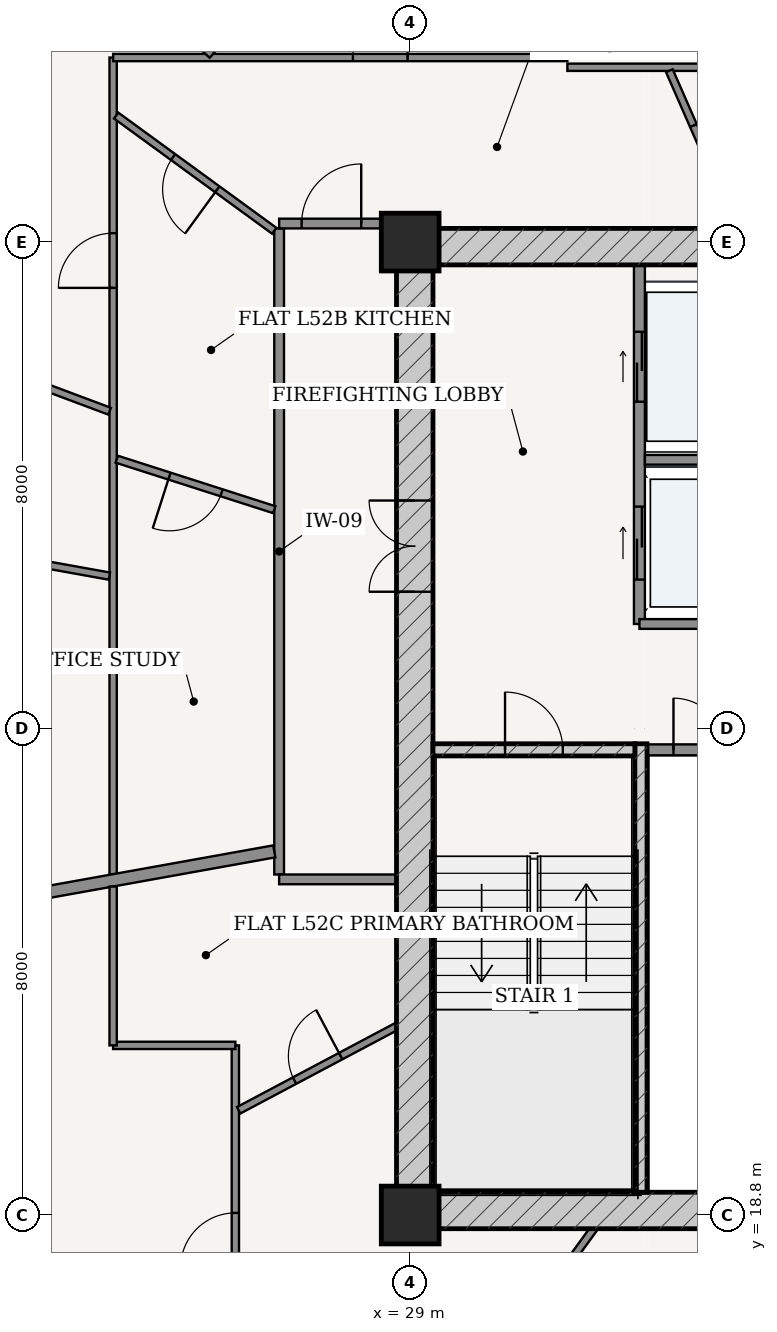
"""IFC4 building model, lengths in metres.
Left out: names, types, materials, properties, quantities, classifications, styles, units other than length and angle.
Written with IfcOpenShell. Run it as: python <this file> out.ifc"""

import sys

from ifc_helpers import new_model, si_unit, direction, frame, frame_2d, origin, origin_2d, place, context, subcontext, project, spatial, rectangle, extrude, source, transform, mapped, element, fill, save


model = new_model("IFC4")
c1 = context("Model", 3, precision=1e-05, world=origin(), true_north=direction((-0.2419218956, 0.970295726276)))
c2 = subcontext(c1, "Body", "Model", "MODEL_VIEW")
j1 = project(units=[si_unit("LENGTHUNIT", "METRE"), si_unit("PLANEANGLEUNIT", "RADIAN")], contexts=[c1])
p1 = place(None, origin())
s1 = spatial("IfcSite", under=j1, at=p1, CompositionType="ELEMENT")
p2 = place(p1, origin())
s2 = spatial("IfcBuilding", under=s1, at=p2, CompositionType="ELEMENT")
p3 = place(p2, frame((0.0, 0.0, 198.6)))
s3 = spatial("IfcBuildingStorey", under=s2, at=p3, CompositionType="ELEMENT", Elevation=198.6)
for number, where, z_axis, x_axis in (
    (1, (29.0, 18.8, 0.0), (0.0, 0.0, 1.0), (1.0, 0.0, 0.0)),
    (2, (29.0, 34.8, 0.0), (0.0, 0.0, 1.0), (1.0, 0.0, 0.0)),
):
    element("IfcColumn", number, at=place(p3, frame(where, z_axis=z_axis, x_axis=x_axis)), inside=s3, PredefinedType="COLUMN", context=c2, shape_type="SweptSolid", body=[
        extrude(rectangle(XDim=0.95, YDim=0.95, at=origin_2d()), origin(), (0.0, 0.0, 1.0), 3.7),
    ])
p4 = place(p3, frame((28.775, 18.875, 0.0), z_axis=(0.0, 0.0, 1.0), x_axis=(1.0, 0.0, 0.0)))
e3 = element("IfcWall", 3, at=p4, inside=s3, PredefinedType="SHEAR", context=c2, shape_type="SweptSolid", body=[
    extrude(rectangle(XDim=18.45, YDim=0.6, at=frame_2d((9.225, 0.0))), origin(), (0.0, 0.0, 1.0), 3.435),
])
p5 = place(p4, frame((8.8, 0.0, 0.0)))
e4 = element("IfcOpeningElement", 4, at=p5, cuts=e3, PredefinedType="OPENING", context=c2, shape_type="SweptSolid", body=[
    extrude(rectangle(XDim=0.85, YDim=2.1, at=frame_2d((0.425, 1.05))), frame((0.0, 0.31, 0.0), z_axis=(0.0, -1.0, 0.0), x_axis=(1.0, 0.0, 0.0)), (0.0, 0.0, 1.0), 0.62),
])
p6 = place(p3, frame((28.775, 34.725, 0.0), z_axis=(0.0, 0.0, 1.0), x_axis=(1.0, 0.0, 0.0)))
e5 = element("IfcWall", 5, at=p6, inside=s3, PredefinedType="SHEAR", context=c2, shape_type="SweptSolid", body=[
    extrude(rectangle(XDim=18.45, YDim=0.6, at=frame_2d((9.225, 0.0))), origin(), (0.0, 0.0, 1.0), 3.435),
])
p7 = place(p3, frame((29.075, 19.175, 0.0), z_axis=(0.0, 0.0, 1.0), x_axis=(0.0, 1.0, 0.0)))
e6 = element("IfcWall", 6, at=p7, inside=s3, PredefinedType="SHEAR", context=c2, shape_type="SweptSolid", body=[
    extrude(rectangle(XDim=15.25, YDim=0.6, at=frame_2d((7.625, 0.0))), origin(), (0.0, 0.0, 1.0), 3.435),
])
p8 = place(p7, frame((9.875, 0.0, 0.0)))
e7 = element("IfcOpeningElement", 7, at=p8, cuts=e6, PredefinedType="OPENING", context=c2, shape_type="SweptSolid", body=[
    extrude(rectangle(XDim=1.5, YDim=2.2, at=frame_2d((0.75, 1.1))), frame((0.0, 0.31, 0.0), z_axis=(0.0, -1.0, 0.0), x_axis=(1.0, 0.0, 0.0)), (0.0, 0.0, 1.0), 0.62),
])
p9 = place(p3, frame((32.795, 19.175, 0.0), z_axis=(0.0, 0.0, 1.0), x_axis=(0.0, 1.0, 0.0)))
e8 = element("IfcWall", 8, at=p9, inside=s3, PredefinedType="SOLIDWALL", context=c2, shape_type="SweptSolid", body=[
    extrude(rectangle(XDim=7.375, YDim=0.2, at=frame_2d((3.688, 0.0))), origin(), (0.0, 0.0, 1.0), 3.435),
])
p10 = place(p3, frame((29.375, 26.45, 0.0), z_axis=(0.0, 0.0, 1.0), x_axis=(1.0, 0.0, 0.0)))
e9 = element("IfcWall", 9, at=p10, inside=s3, PredefinedType="SOLIDWALL", context=c2, shape_type="SweptSolid", body=[
    extrude(rectangle(XDim=3.32, YDim=0.2, at=frame_2d((1.66, 0.0))), origin(), (0.0, 0.0, 1.0), 3.435),
])
p11 = place(p10, frame((1.185, 0.0, 0.0)))
e10 = element("IfcOpeningElement", 10, at=p11, cuts=e9, PredefinedType="OPENING", context=c2, shape_type="SweptSolid", body=[
    extrude(rectangle(XDim=0.95, YDim=2.15, at=frame_2d((0.475, 1.075))), frame((0.0, 0.11, 0.0), z_axis=(0.0, -1.0, 0.0), x_axis=(1.0, 0.0, 0.0)), (0.0, 0.0, 1.0), 0.22),
])
p12 = place(p3, frame((32.9, 26.45, 0.0), z_axis=(0.0, 0.0, 1.0), x_axis=(1.0, 0.0, 0.0)))
e11 = element("IfcWall", 11, at=p12, inside=s3, PredefinedType="PARTITIONING", context=c2, shape_type="SweptSolid", body=[
    extrude(rectangle(XDim=1.71, YDim=0.18, at=frame_2d((0.855, 0.0))), origin(), (0.0, 0.0, 1.0), 3.435),
])
p13 = place(p12, frame((0.43, 0.0, 0.0)))
e12 = element("IfcOpeningElement", 12, at=p13, cuts=e11, PredefinedType="OPENING", context=c2, shape_type="SweptSolid", body=[
    extrude(rectangle(XDim=0.85, YDim=2.1, at=frame_2d((0.425, 1.05))), frame((0.0, 0.1, 0.0), z_axis=(0.0, -1.0, 0.0), x_axis=(1.0, 0.0, 0.0)), (0.0, 0.0, 1.0), 0.2),
])
p14 = place(p3, frame((32.77, 28.52, 0.0), z_axis=(0.0, 0.0, 1.0), x_axis=(0.0, 1.0, 0.0)))
e13 = element("IfcWall", 13, at=p14, inside=s3, PredefinedType="PARTITIONING", context=c2, shape_type="SweptSolid", body=[
    extrude(rectangle(XDim=5.905, YDim=0.18, at=frame_2d((2.953, 0.0))), origin(), (0.0, 0.0, 1.0), 3.435),
])
p15 = place(p14, frame((3.655, 0.0, 0.0)))
e14 = element("IfcOpeningElement", 14, at=p15, cuts=e13, PredefinedType="OPENING", context=c2, shape_type="SweptSolid", body=[
    extrude(rectangle(XDim=1.15, YDim=2.2, at=frame_2d((0.575, 1.1))), frame((0.0, 0.1, 0.0), z_axis=(0.0, -1.0, 0.0), x_axis=(1.0, 0.0, 0.0)), (0.0, 0.0, 1.0), 0.2),
])
p16 = place(p14, frame((0.73, 0.0, 0.0)))
e15 = element("IfcOpeningElement", 15, at=p16, cuts=e13, PredefinedType="OPENING", context=c2, shape_type="SweptSolid", body=[
    extrude(rectangle(XDim=1.2, YDim=2.25, at=frame_2d((0.6, 1.125))), frame((0.0, 0.1, 0.0), z_axis=(0.0, -1.0, 0.0), x_axis=(1.0, 0.0, 0.0)), (0.0, 0.0, 1.0), 0.2),
])
p17 = place(p3, frame((32.86, 31.22, 0.0), z_axis=(0.0, 0.0, 1.0), x_axis=(1.0, 0.0, 0.0)))
e16 = element("IfcWall", 16, at=p17, inside=s3, PredefinedType="PARTITIONING", context=c2, shape_type="SweptSolid", body=[
    extrude(rectangle(XDim=1.75, YDim=0.16, at=frame_2d((0.875, 0.0))), origin(), (0.0, 0.0, 1.0), 3.435),
])
p18 = place(p3, frame((32.77, 28.52, 0.0), z_axis=(0.0, 0.0, 1.0), x_axis=(1.0, 0.0, 0.0)))
e17 = element("IfcWall", 17, at=p18, inside=s3, PredefinedType="PARTITIONING", context=c2, shape_type="SweptSolid", body=[
    extrude(rectangle(XDim=1.84, YDim=0.16, at=frame_2d((0.92, 0.0))), origin(), (0.0, 0.0, 1.0), 3.435),
])
p19 = place(p3, frame((26.845, 24.4, 0.0), z_axis=(0.0, 0.0, 1.0), x_axis=(0.0, 1.0, 0.0)))
e18 = element("IfcWall", 18, at=p19, inside=s3, PredefinedType="PARTITIONING", context=c2, shape_type="SweptSolid", body=[
    extrude(rectangle(XDim=10.625, YDim=0.16, at=frame_2d((5.312, 0.0))), origin(), (0.0, 0.0, 1.0), 2.951),
])
p20 = place(p3, frame((26.845, 35.105, 0.0), z_axis=(0.0, 0.0, 1.0), x_axis=(1.0, 0.0, 0.0)))
e19 = element("IfcWall", 19, at=p20, inside=s3, PredefinedType="PARTITIONING", context=c2, shape_type="SweptSolid", body=[
    extrude(rectangle(XDim=1.93, YDim=0.16, at=frame_2d((0.965, 0.0))), origin(), (0.0, 0.0, 1.0), 3.435),
])
p21 = place(p20, frame((0.37, 0.0, 0.0)))
e20 = element("IfcOpeningElement", 20, at=p21, cuts=e19, PredefinedType="OPENING", context=c2, shape_type="SweptSolid", body=[
    extrude(rectangle(XDim=0.98, YDim=2.2, at=frame_2d((0.49, 1.1))), frame((0.0, 0.09, 0.0), z_axis=(0.0, -1.0, 0.0), x_axis=(1.0, 0.0, 0.0)), (0.0, 0.0, 1.0), 0.18),
])
p22 = place(p3, frame((26.845, 24.32, 0.0), z_axis=(0.0, 0.0, 1.0), x_axis=(1.0, 0.0, 0.0)))
e21 = element("IfcWall", 21, at=p22, inside=s3, PredefinedType="PARTITIONING", context=c2, shape_type="SweptSolid", body=[
    extrude(rectangle(XDim=1.93, YDim=0.16, at=frame_2d((0.965, 0.0))), origin(), (0.0, 0.0, 1.0), 3.435),
])
p23 = place(p3, frame((24.115, 24.406, 0.0), z_axis=(0.0, 0.0, 1.0), x_axis=(0.0, 1.0, 0.0)))
e22 = element("IfcWall", 22, at=p23, inside=s3, PredefinedType="PARTITIONING", context=c2, shape_type="SweptSolid", body=[
    extrude(rectangle(XDim=13.429, YDim=0.12, at=frame_2d((6.714, 0.0))), origin(), (0.0, 0.0, 1.0), 2.951),
])
p24 = place(p23, frame((9.641, 0.0, 0.0)))
e23 = element("IfcOpeningElement", 23, at=p24, cuts=e22, PredefinedType="OPENING", context=c2, shape_type="SweptSolid", body=[
    extrude(rectangle(XDim=0.9, YDim=2.15, at=frame_2d((0.45, 1.075))), frame((0.0, 0.07, 0.0), z_axis=(0.0, -1.0, 0.0), x_axis=(1.0, 0.0, 0.0)), (0.0, 0.0, 1.0), 0.14),
])
p25 = place(p3, frame((24.115, 37.835, 0.0), z_axis=(0.0, 0.0, 1.0), x_axis=(1.0, 0.0, 0.0)))
e24 = element("IfcWall", 24, at=p25, inside=s3, PredefinedType="PARTITIONING", context=c2, shape_type="SweptSolid", body=[
    extrude(rectangle(XDim=7.47, YDim=0.12, at=frame_2d((3.735, 0.0))), origin(), (0.0, 0.0, 1.0), 2.951),
])
p26 = place(p25, frame((3.943, 0.0, 0.0)))
e25 = element("IfcOpeningElement", 25, at=p26, cuts=e24, PredefinedType="OPENING", context=c2, shape_type="SweptSolid", body=[
    extrude(rectangle(XDim=0.9, YDim=2.15, at=frame_2d((0.45, 1.075))), frame((0.0, 0.07, 0.0), z_axis=(0.0, -1.0, 0.0), x_axis=(1.0, 0.0, 0.0)), (0.0, 0.0, 1.0), 0.14),
])
p27 = place(p3, frame((31.585, 37.675, 0.0), z_axis=(0.0, 0.0, 1.0), x_axis=(1.0, 0.0, 0.0)))
e26 = element("IfcWall", 26, at=p27, inside=s3, PredefinedType="PARTITIONING", context=c2, shape_type="SweptSolid", body=[
    extrude(rectangle(XDim=6.313, YDim=0.12, at=frame_2d((3.156, 0.0))), origin(), (0.0, 0.0, 1.0), 2.951),
])
p28 = place(p3, frame((25.743, 37.876, 0.0), z_axis=(0.0, 0.0, 1.0), x_axis=(-0.741943837234, 0.670462036502, 0.0)))
e27 = element("IfcWall", 27, at=p28, inside=s3, PredefinedType="PARTITIONING", context=c2, shape_type="SweptSolid", body=[
    extrude(rectangle(XDim=4.194, YDim=0.12, at=frame_2d((2.097, 0.0))), origin(), (0.0, 0.0, 1.0), 2.951),
])
p29 = place(p3, frame((24.057, 32.019, 0.0), z_axis=(0.0, 0.0, 1.0), x_axis=(-0.936540194592, 0.350560214389, 0.0)))
e28 = element("IfcWall", 28, at=p29, inside=s3, PredefinedType="PARTITIONING", context=c2, shape_type="SweptSolid", body=[
    extrude(rectangle(XDim=6.556, YDim=0.12, at=frame_2d((3.278, 0.0))), origin(), (0.0, 0.0, 1.0), 2.951),
])
p30 = place(p29, frame((2.828, 0.0, 0.0)))
e29 = element("IfcOpeningElement", 29, at=p30, cuts=e28, PredefinedType="OPENING", context=c2, shape_type="SweptSolid", body=[
    extrude(rectangle(XDim=0.9, YDim=2.15, at=frame_2d((0.45, 1.075))), frame((0.0, 0.07, 0.0), z_axis=(0.0, -1.0, 0.0), x_axis=(1.0, 0.0, 0.0)), (0.0, 0.0, 1.0), 0.14),
])
p31 = place(p3, frame((24.054, 29.307, 0.0), z_axis=(0.0, 0.0, 1.0), x_axis=(-0.984227185588, 0.176909149424, 0.0)))
e30 = element("IfcWall", 30, at=p31, inside=s3, PredefinedType="PARTITIONING", context=c2, shape_type="SweptSolid", body=[
    extrude(rectangle(XDim=7.448, YDim=0.12, at=frame_2d((3.724, 0.0))), origin(), (0.0, 0.0, 1.0), 2.951),
])
p32 = place(p31, frame((2.264, 0.0, 0.0)))
e31 = element("IfcOpeningElement", 31, at=p32, cuts=e30, PredefinedType="OPENING", context=c2, shape_type="SweptSolid", body=[
    extrude(rectangle(XDim=0.9, YDim=2.15, at=frame_2d((0.45, 1.075))), frame((0.0, 0.07, 0.0), z_axis=(0.0, -1.0, 0.0), x_axis=(1.0, 0.0, 0.0)), (0.0, 0.0, 1.0), 0.14),
])
p33 = place(p3, frame((34.397, 35.027, 0.0), z_axis=(0.0, 0.0, 1.0), x_axis=(-0.401135725485, 0.916018629581, 0.0)))
e32 = element("IfcWall", 32, at=p33, inside=s3, PredefinedType="PARTITIONING", context=c2, shape_type="SweptSolid", body=[
    extrude(rectangle(XDim=2.829, YDim=0.12, at=frame_2d((1.415, 0.0))), origin(), (0.0, 0.0, 1.0), 3.435),
])
p34 = place(p33, frame((0.985, 0.0, 0.0)))
e33 = element("IfcOpeningElement", 33, at=p34, cuts=e32, PredefinedType="OPENING", context=c2, shape_type="SweptSolid", body=[
    extrude(rectangle(XDim=0.86, YDim=2.15, at=frame_2d((0.43, 1.075))), frame((0.0, 0.07, 0.0), z_axis=(0.0, -1.0, 0.0), x_axis=(1.0, 0.0, 0.0)), (0.0, 0.0, 1.0), 0.14),
])
p35 = place(p3, frame((26.765, 34.986, 0.0), z_axis=(0.0, 0.0, 1.0), x_axis=(-0.808220499107, 0.588879974887, 0.0)))
e34 = element("IfcWall", 34, at=p35, inside=s3, PredefinedType="PARTITIONING", context=c2, shape_type="SweptSolid", body=[
    extrude(rectangle(XDim=3.217, YDim=0.12, at=frame_2d((1.608, 0.0))), origin(), (0.0, 0.0, 1.0), 3.11),
])
p36 = place(p35, frame((1.158, 0.0, 0.0)))
e35 = element("IfcOpeningElement", 35, at=p36, cuts=e34, PredefinedType="OPENING", context=c2, shape_type="SweptSolid", body=[
    extrude(rectangle(XDim=0.9, YDim=2.15, at=frame_2d((0.45, 1.075))), frame((0.0, 0.07, 0.0), z_axis=(0.0, -1.0, 0.0), x_axis=(1.0, 0.0, 0.0)), (0.0, 0.0, 1.0), 0.14),
])
p37 = place(p3, frame((26.765, 30.4, 0.0), z_axis=(0.0, 0.0, 1.0), x_axis=(-0.952315722301, 0.305114347514, 0.0)))
e36 = element("IfcWall", 36, at=p37, inside=s3, PredefinedType="PARTITIONING", context=c2, shape_type="SweptSolid", body=[
    extrude(rectangle(XDim=2.72, YDim=0.12, at=frame_2d((1.36, 0.0))), origin(), (0.0, 0.0, 1.0), 3.435),
])
p38 = place(p37, frame((0.91, 0.0, 0.0)))
e37 = element("IfcOpeningElement", 37, at=p38, cuts=e36, PredefinedType="OPENING", context=c2, shape_type="SweptSolid", body=[
    extrude(rectangle(XDim=0.9, YDim=2.15, at=frame_2d((0.45, 1.075))), frame((0.0, 0.07, 0.0), z_axis=(0.0, -1.0, 0.0), x_axis=(1.0, 0.0, 0.0)), (0.0, 0.0, 1.0), 0.14),
])
p39 = place(p3, frame((26.765, 24.781, 0.0), z_axis=(0.0, 0.0, 1.0), x_axis=(-0.984226684914, -0.176911934879, 0.0)))
e38 = element("IfcWall", 38, at=p39, inside=s3, PredefinedType="PARTITIONING", context=c2, shape_type="SweptSolid", body=[
    extrude(rectangle(XDim=10.202, YDim=0.2, at=frame_2d((5.101, 0.0))), origin(), (0.0, 0.0, 1.0), 2.951),
])
p40 = place(p3, frame((26.125, 15.925, 0.0), z_axis=(0.0, 0.0, 1.0), x_axis=(0.0, 1.0, 0.0)))
e39 = element("IfcWall", 39, at=p40, inside=s3, PredefinedType="PARTITIONING", context=c2, shape_type="SweptSolid", body=[
    extrude(rectangle(XDim=5.665, YDim=0.12, at=frame_2d((2.833, 0.0))), origin(), (0.0, 0.0, 1.0), 2.951),
])
p41 = place(p40, frame((2.01, 0.0, 0.0)))
e40 = element("IfcOpeningElement", 40, at=p41, cuts=e39, PredefinedType="OPENING", context=c2, shape_type="SweptSolid", body=[
    extrude(rectangle(XDim=0.9, YDim=2.15, at=frame_2d((0.45, 1.075))), frame((0.0, 0.07, 0.0), z_axis=(0.0, -1.0, 0.0), x_axis=(1.0, 0.0, 0.0)), (0.0, 0.0, 1.0), 0.14),
])
p42 = place(p3, frame((26.125, 21.59, 0.0), z_axis=(0.0, 0.0, 1.0), x_axis=(-1.0, 0.0, 0.0)))
e41 = element("IfcWall", 41, at=p42, inside=s3, PredefinedType="PARTITIONING", context=c2, shape_type="SweptSolid", body=[
    extrude(rectangle(XDim=2.01, YDim=0.12, at=frame_2d((1.005, 0.0))), origin(), (0.0, 0.0, 1.0), 3.11),
])
p43 = place(p3, frame((24.115, 21.59, 0.0), z_axis=(0.0, 0.0, 1.0), x_axis=(0.0, 1.0, 0.0)))
e42 = element("IfcWall", 42, at=p43, inside=s3, PredefinedType="PARTITIONING", context=c2, shape_type="SweptSolid", body=[
    extrude(rectangle(XDim=2.612, YDim=0.12, at=frame_2d((1.306, 0.0))), origin(), (0.0, 0.0, 1.0), 3.11),
])
p44 = place(p3, frame((28.775, 21.901, 0.0), z_axis=(0.0, 0.0, 1.0), x_axis=(-0.883156592468, -0.46907828044, 0.0)))
e43 = element("IfcWall", 43, at=p44, inside=s3, PredefinedType="PARTITIONING", context=c2, shape_type="SweptSolid", body=[
    extrude(rectangle(XDim=2.938, YDim=0.12, at=frame_2d((1.469, 0.0))), origin(), (0.0, 0.0, 1.0), 3.435),
])
p45 = place(p44, frame((1.039, 0.0, 0.0)))
e44 = element("IfcOpeningElement", 44, at=p45, cuts=e43, PredefinedType="OPENING", context=c2, shape_type="SweptSolid", body=[
    extrude(rectangle(XDim=0.86, YDim=2.15, at=frame_2d((0.43, 1.075))), frame((0.0, 0.07, 0.0), z_axis=(0.0, -1.0, 0.0), x_axis=(1.0, 0.0, 0.0)), (0.0, 0.0, 1.0), 0.14),
])
p46 = place(p3, frame((32.019, 18.575, 0.0), z_axis=(0.0, 0.0, 1.0), x_axis=(-0.588135570825, -0.808762357143, 0.0)))
e45 = element("IfcWall", 45, at=p46, inside=s3, PredefinedType="PARTITIONING", context=c2, shape_type="SweptSolid", body=[
    extrude(rectangle(XDim=3.215, YDim=0.12, at=frame_2d((1.607, 0.0))), origin(), (0.0, 0.0, 1.0), 3.435),
])
p47 = place(p46, frame((1.157, 0.0, 0.0)))
e46 = element("IfcOpeningElement", 46, at=p47, cuts=e45, PredefinedType="OPENING", context=c2, shape_type="SweptSolid", body=[
    extrude(rectangle(XDim=0.9, YDim=2.15, at=frame_2d((0.45, 1.075))), frame((0.0, 0.07, 0.0), z_axis=(0.0, -1.0, 0.0), x_axis=(1.0, 0.0, 0.0)), (0.0, 0.0, 1.0), 0.14),
])
m1 = source(origin(), c2, "Body", "SweptSolid", [
    extrude(rectangle(XDim=1.5, YDim=2.2, at=frame_2d((0.75, 1.1))), frame((0.0, 0.025, 0.0), z_axis=(0.0, -1.0, 0.0), x_axis=(1.0, 0.0, 0.0)), (0.0, 0.0, 1.0), 0.05),
])
p48 = place(p8, origin())
e47 = element("IfcDoor", 47, at=p48, inside=s3, OperationType="DOUBLE_DOOR_SINGLE_SWING", PredefinedType="DOOR", context=c2, shape_type="MappedRepresentation", body=[
    mapped(m1, transform((0.0, 0.0, 0.0), scale=1.0)),
])
fill(e7, e47)
m2 = source(origin(), c2, "Body", "SweptSolid", [
    extrude(rectangle(XDim=0.95, YDim=2.15, at=frame_2d((0.475, 1.075))), frame((0.0, 0.025, 0.0), z_axis=(0.0, -1.0, 0.0), x_axis=(1.0, 0.0, 0.0)), (0.0, 0.0, 1.0), 0.05),
])
p49 = place(p11, origin())
e48 = element("IfcDoor", 48, at=p49, inside=s3, OperationType="SINGLE_SWING_LEFT", PredefinedType="DOOR", context=c2, shape_type="MappedRepresentation", body=[
    mapped(m2, transform((0.0, 0.0, 0.0), scale=1.0)),
])
fill(e10, e48)
m3 = source(origin(), c2, "Body", "SweptSolid", [
    extrude(rectangle(XDim=0.85, YDim=2.1, at=frame_2d((0.425, 1.05))), frame((0.0, 0.025, 0.0), z_axis=(0.0, -1.0, 0.0), x_axis=(1.0, 0.0, 0.0)), (0.0, 0.0, 1.0), 0.05),
])
p50 = place(p13, origin())
e49 = element("IfcDoor", 49, at=p50, inside=s3, OperationType="SINGLE_SWING_LEFT", PredefinedType="DOOR", context=c2, shape_type="MappedRepresentation", body=[
    mapped(m3, transform((0.0, 0.0, 0.0), scale=1.0)),
])
fill(e12, e49)
m4 = source(origin(), c2, "Body", "SweptSolid", [
    extrude(rectangle(XDim=1.15, YDim=2.2, at=frame_2d((0.575, 1.1))), frame((0.0, 0.025, 0.0), z_axis=(0.0, -1.0, 0.0), x_axis=(1.0, 0.0, 0.0)), (0.0, 0.0, 1.0), 0.05),
])
p51 = place(p15, origin())
e50 = element("IfcDoor", 50, at=p51, inside=s3, OperationType="DOUBLE_DOOR_SLIDING", PredefinedType="DOOR", context=c2, shape_type="MappedRepresentation", body=[
    mapped(m4, transform((0.0, 0.0, 0.0), scale=1.0)),
])
fill(e14, e50)
m5 = source(origin(), c2, "Body", "SweptSolid", [
    extrude(rectangle(XDim=1.2, YDim=2.25, at=frame_2d((0.6, 1.125))), frame((0.0, 0.025, 0.0), z_axis=(0.0, -1.0, 0.0), x_axis=(1.0, 0.0, 0.0)), (0.0, 0.0, 1.0), 0.05),
])
p52 = place(p16, origin())
e51 = element("IfcDoor", 51, at=p52, inside=s3, OperationType="DOUBLE_DOOR_SLIDING", PredefinedType="DOOR", context=c2, shape_type="MappedRepresentation", body=[
    mapped(m5, transform((0.0, 0.0, 0.0), scale=1.0)),
])
fill(e15, e51)
m6 = source(origin(), c2, "Body", "SweptSolid", [
    extrude(rectangle(XDim=0.98, YDim=2.2, at=frame_2d((0.49, 1.1))), frame((0.0, 0.025, 0.0), z_axis=(0.0, -1.0, 0.0), x_axis=(1.0, 0.0, 0.0)), (0.0, 0.0, 1.0), 0.05),
])
p53 = place(p21, origin())
e52 = element("IfcDoor", 52, at=p53, inside=s3, OperationType="SINGLE_SWING_RIGHT", PredefinedType="DOOR", context=c2, shape_type="MappedRepresentation", body=[
    mapped(m6, transform((0.0, 0.0, 0.0), scale=1.0)),
])
fill(e20, e52)
m7 = source(origin(), c2, "Body", "SweptSolid", [
    extrude(rectangle(XDim=0.86, YDim=2.15, at=frame_2d((0.43, 1.075))), frame((0.0, 0.025, 0.0), z_axis=(0.0, -1.0, 0.0), x_axis=(1.0, 0.0, 0.0)), (0.0, 0.0, 1.0), 0.05),
])
p54 = place(p34, frame((0.86, 0.0, 0.0), z_axis=(0.0, 0.0, 1.0), x_axis=(-1.0, 0.0, 0.0)))
e53 = element("IfcDoor", 53, at=p54, inside=s3, OperationType="SINGLE_SWING_LEFT", PredefinedType="DOOR", context=c2, shape_type="MappedRepresentation", body=[
    mapped(m7, transform((0.0, 0.0, 0.0), scale=1.0)),
])
fill(e33, e53)
m8 = source(origin(), c2, "Body", "SweptSolid", [
    extrude(rectangle(XDim=0.9, YDim=2.15, at=frame_2d((0.45, 1.075))), frame((0.0, 0.025, 0.0), z_axis=(0.0, -1.0, 0.0), x_axis=(1.0, 0.0, 0.0)), (0.0, 0.0, 1.0), 0.05),
])
p55 = place(p26, origin())
e54 = element("IfcDoor", 54, at=p55, inside=s3, OperationType="SINGLE_SWING_RIGHT", PredefinedType="DOOR", context=c2, shape_type="MappedRepresentation", body=[
    mapped(m8, transform((0.0, 0.0, 0.0), scale=1.0)),
])
fill(e25, e54)
p56 = place(p36, origin())
e55 = element("IfcDoor", 55, at=p56, inside=s3, OperationType="SINGLE_SWING_LEFT", PredefinedType="DOOR", context=c2, shape_type="MappedRepresentation", body=[
    mapped(m8, transform((0.0, 0.0, 0.0), scale=1.0)),
])
fill(e35, e55)
p57 = place(p38, origin())
e56 = element("IfcDoor", 56, at=p57, inside=s3, OperationType="SINGLE_SWING_RIGHT", PredefinedType="DOOR", context=c2, shape_type="MappedRepresentation", body=[
    mapped(m8, transform((0.0, 0.0, 0.0), scale=1.0)),
])
fill(e37, e56)
p58 = place(p24, origin())
e57 = element("IfcDoor", 57, at=p58, inside=s3, OperationType="SINGLE_SWING_LEFT", PredefinedType="DOOR", context=c2, shape_type="MappedRepresentation", body=[
    mapped(m8, transform((0.0, 0.0, 0.0), scale=1.0)),
])
fill(e23, e57)
p59 = place(p45, frame((0.86, 0.0, 0.0), z_axis=(0.0, 0.0, 1.0), x_axis=(-1.0, 0.0, 0.0)))
e58 = element("IfcDoor", 58, at=p59, inside=s3, OperationType="SINGLE_SWING_RIGHT", PredefinedType="DOOR", context=c2, shape_type="MappedRepresentation", body=[
    mapped(m7, transform((0.0, 0.0, 0.0), scale=1.0)),
])
fill(e44, e58)
p60 = place(p41, origin())
e59 = element("IfcDoor", 59, at=p60, inside=s3, OperationType="SINGLE_SWING_LEFT", PredefinedType="DOOR", context=c2, shape_type="MappedRepresentation", body=[
    mapped(m8, transform((0.0, 0.0, 0.0), scale=1.0)),
])
fill(e40, e59)
save(model, sys.argv[1])
